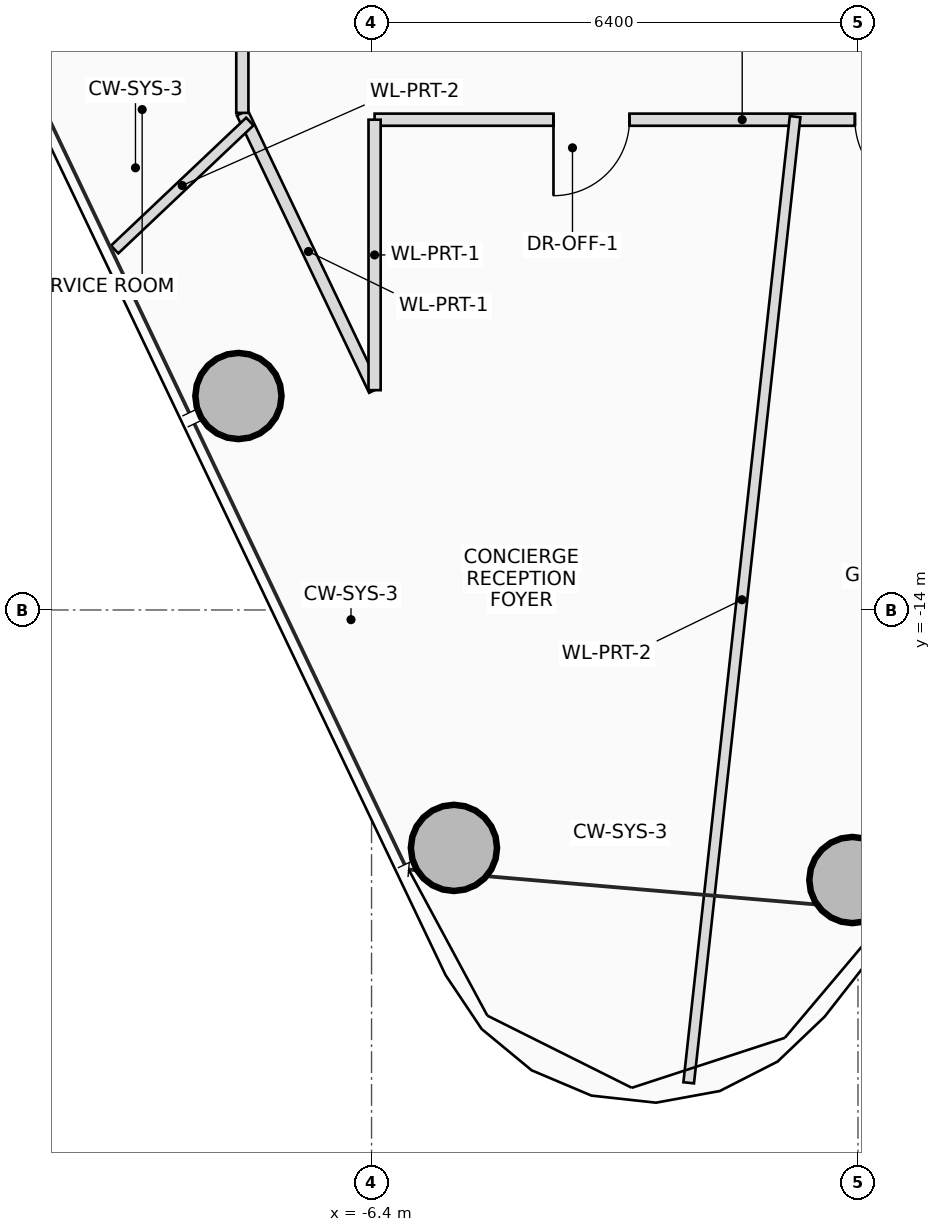
"""IFC4 building model, lengths in metres.
Left out: names, types, materials, properties, quantities, classifications, styles, units other than length and angle.
Written with IfcOpenShell. Run it as: python <this file> out.ifc"""

import sys

from ifc_helpers import new_model, si_unit, direction, frame, frame_2d, origin, origin_2d, place, context, subcontext, project, spatial, rectangle, hollow_circle, extrude, source, transform, mapped, element, fill, save


model = new_model("IFC4")
c1 = context("Model", 3, precision=1e-05, world=origin(), true_north=direction((0.0, 1.0)))
c2 = subcontext(c1, "Body", "Model", "MODEL_VIEW")
j1 = project(units=[si_unit("LENGTHUNIT", "METRE"), si_unit("PLANEANGLEUNIT", "RADIAN")], contexts=[c1])
p1 = place(None, origin())
s1 = spatial("IfcSite", under=j1, at=p1, CompositionType="ELEMENT")
p2 = place(p1, origin())
s2 = spatial("IfcBuilding", under=s1, at=p2, CompositionType="ELEMENT")
p3 = place(p2, frame((0.0, 0.0, 205.25)))
s3 = spatial("IfcBuildingStorey", under=s2, at=p3, CompositionType="ELEMENT", Elevation=205.25)
m1 = source(origin(), c2, "Body", "SweptSolid", [
    extrude(hollow_circle(Radius=0.575, WallThickness=0.042, at=origin_2d()), origin(), (0.0, 0.0, 1.0), 3.45),
])
for number, where, z_axis, x_axis in (
    (1, (-0.073, -17.553, 0.0), (0.0, 0.0, 1.0), (1.0, 0.0, 0.0)),
    (2, (-8.151, -11.185, 0.0), (0.0, 0.0, 1.0), (1.0, 0.0, 0.0)),
    (3, (-5.316, -17.13, 0.0), (0.0, 0.0, 1.0), (1.0, 0.0, 0.0)),
):
    element("IfcColumn", number, at=place(p3, frame(where, z_axis=z_axis, x_axis=x_axis)), inside=s3, PredefinedType="COLUMN", context=c2, shape_type="MappedRepresentation", body=[
        mapped(m1, transform((0.0, 0.0, 0.0), scale=1.0)),
    ])
p4 = place(p3, frame((-6.36, -11.108, 0.0), z_axis=(0.0, 0.0, 1.0), x_axis=(-0.430489180359, 0.902595737633, 0.0)))
e4 = element("IfcWall", 4, at=p4, inside=s3, PredefinedType="PARTITIONING", context=c2, shape_type="SweptSolid", body=[
    extrude(rectangle(XDim=4.042, YDim=0.16, at=frame_2d((2.021, 0.0))), origin(), (0.0, 0.0, 1.0), 2.605),
])
p5 = place(p3, frame((-8.1, -7.46, 0.0), z_axis=(0.0, 0.0, 1.0), x_axis=(0.0, 1.0, 0.0)))
e5 = element("IfcWall", 5, at=p5, inside=s3, PredefinedType="PARTITIONING", context=c2, shape_type="SweptSolid", body=[
    extrude(rectangle(XDim=15.01, YDim=0.16, at=frame_2d((7.505, 0.0))), origin(), (0.0, 0.0, 1.0), 2.605),
])
p6 = place(p5, frame((1.537, 0.0, 0.0)))
e6 = element("IfcOpeningElement", 6, at=p6, cuts=e5, PredefinedType="OPENING", context=c2, shape_type="SweptSolid", body=[
    extrude(rectangle(XDim=0.9, YDim=2.05, at=frame_2d((0.45, 1.025))), frame((0.0, 0.09, 0.0), z_axis=(0.0, -1.0, 0.0), x_axis=(1.0, 0.0, 0.0)), (0.0, 0.0, 1.0), 0.18),
])
p7 = place(p5, frame((6.522, 0.0, 0.0)))
e7 = element("IfcOpeningElement", 7, at=p7, cuts=e5, PredefinedType="OPENING", context=c2, shape_type="SweptSolid", body=[
    extrude(rectangle(XDim=1.05, YDim=2.2, at=frame_2d((0.525, 1.1))), frame((0.0, 0.09, 0.0), z_axis=(0.0, -1.0, 0.0), x_axis=(1.0, 0.0, 0.0)), (0.0, 0.0, 1.0), 0.18),
])
p8 = place(p5, frame((11.604, 0.0, 0.0)))
e8 = element("IfcOpeningElement", 8, at=p8, cuts=e5, PredefinedType="OPENING", context=c2, shape_type="SweptSolid", body=[
    extrude(rectangle(XDim=1.05, YDim=2.2, at=frame_2d((0.525, 1.1))), frame((0.0, 0.09, 0.0), z_axis=(0.0, -1.0, 0.0), x_axis=(1.0, 0.0, 0.0)), (0.0, 0.0, 1.0), 0.18),
])
p9 = place(p3, frame((5.25, -7.55, 0.0), z_axis=(0.0, 0.0, 1.0), x_axis=(-1.0, 0.0, 0.0)))
e9 = element("IfcWall", 9, at=p9, inside=s3, PredefinedType="PARTITIONING", context=c2, shape_type="SweptSolid", body=[
    extrude(rectangle(XDim=11.61, YDim=0.16, at=frame_2d((5.805, 0.0))), origin(), (0.0, 0.0, 1.0), 2.605),
])
p10 = place(p9, frame((1.337, 0.0, 0.0)))
e10 = element("IfcOpeningElement", 10, at=p10, cuts=e9, PredefinedType="OPENING", context=c2, shape_type="SweptSolid", body=[
    extrude(rectangle(XDim=1.0, YDim=2.25, at=frame_2d((0.5, 1.125))), frame((0.0, 0.09, 0.0), z_axis=(0.0, -1.0, 0.0), x_axis=(1.0, 0.0, 0.0)), (0.0, 0.0, 1.0), 0.18),
])
p11 = place(p9, frame((4.29, 0.0, 0.0)))
e11 = element("IfcOpeningElement", 11, at=p11, cuts=e9, PredefinedType="OPENING", context=c2, shape_type="SweptSolid", body=[
    extrude(rectangle(XDim=1.0, YDim=2.25, at=frame_2d((0.5, 1.125))), frame((0.0, 0.09, 0.0), z_axis=(0.0, -1.0, 0.0), x_axis=(1.0, 0.0, 0.0)), (0.0, 0.0, 1.0), 0.18),
])
p12 = place(p9, frame((8.256, 0.0, 0.0)))
e12 = element("IfcOpeningElement", 12, at=p12, cuts=e9, PredefinedType="OPENING", context=c2, shape_type="SweptSolid", body=[
    extrude(rectangle(XDim=1.0, YDim=2.25, at=frame_2d((0.5, 1.125))), frame((0.0, 0.09, 0.0), z_axis=(0.0, -1.0, 0.0), x_axis=(1.0, 0.0, 0.0)), (0.0, 0.0, 1.0), 0.18),
])
p13 = place(p3, frame((-6.36, -7.55, 0.0), z_axis=(0.0, 0.0, 1.0), x_axis=(0.0, -1.0, 0.0)))
e13 = element("IfcWall", 13, at=p13, inside=s3, PredefinedType="PARTITIONING", context=c2, shape_type="SweptSolid", body=[
    extrude(rectangle(XDim=3.558, YDim=0.16, at=frame_2d((1.779, 0.0))), origin(), (0.0, 0.0, 1.0), 3.25),
])
p14 = place(p3, frame((-8.001, -7.574, 0.0), z_axis=(0.0, 0.0, 1.0), x_axis=(-0.726232954986, -0.687448685424, 0.0)))
e14 = element("IfcWall", 14, at=p14, inside=s3, PredefinedType="PARTITIONING", context=c2, shape_type="SweptSolid", body=[
    extrude(rectangle(XDim=2.449, YDim=0.14, at=frame_2d((1.224, 0.0))), origin(), (0.0, 0.0, 1.0), 2.765),
])
p15 = place(p3, frame((-0.827, -7.51, 0.0), z_axis=(0.0, 0.0, 1.0), x_axis=(-0.109492708445, -0.993987598915, 0.0)))
e15 = element("IfcWall", 15, at=p15, inside=s3, PredefinedType="PARTITIONING", context=c2, shape_type="SweptSolid", body=[
    extrude(rectangle(XDim=12.788, YDim=0.14, at=frame_2d((6.394, 0.0))), origin(), (0.0, 0.0, 1.0), 2.605),
])
p16 = place(p11, origin())
e16 = element("IfcDoor", 16, at=p16, inside=s3, OperationType="SINGLE_SWING_LEFT", PredefinedType="DOOR", context=c2, shape_type="SweptSolid", body=[
    extrude(rectangle(XDim=1.0, YDim=2.25, at=frame_2d((0.5, 1.125))), frame((0.0, 0.025, 0.0), z_axis=(0.0, -1.0, 0.0), x_axis=(1.0, 0.0, 0.0)), (0.0, 0.0, 1.0), 0.05),
])
fill(e11, e16)
p17 = place(p12, origin())
e17 = element("IfcDoor", 17, at=p17, inside=s3, OperationType="SINGLE_SWING_RIGHT", PredefinedType="DOOR", context=c2, shape_type="SweptSolid", body=[
    extrude(rectangle(XDim=1.0, YDim=2.25, at=frame_2d((0.5, 1.125))), frame((0.0, 0.025, 0.0), z_axis=(0.0, -1.0, 0.0), x_axis=(1.0, 0.0, 0.0)), (0.0, 0.0, 1.0), 0.05),
])
fill(e12, e17)
save(model, sys.argv[1])
